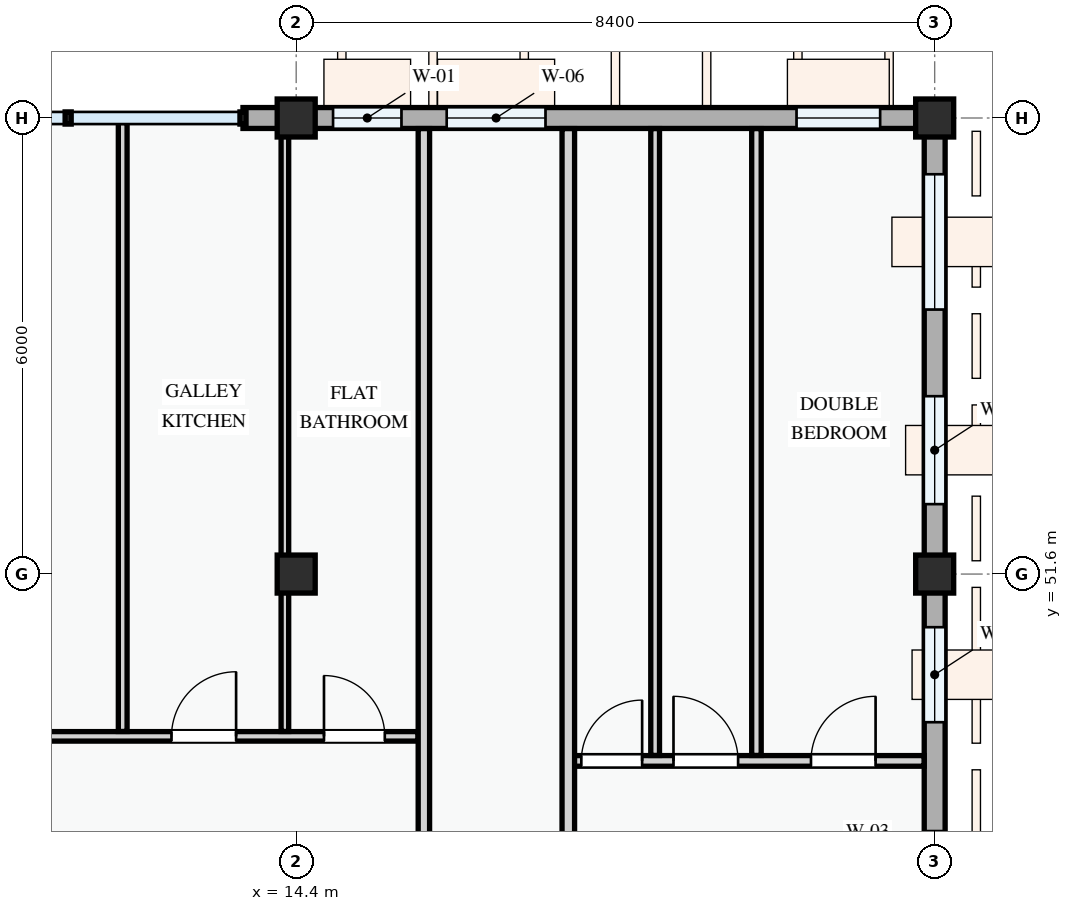
"""IFC4 building model, lengths in metres.
Left out: names, types, materials, properties, quantities, classifications, styles, units other than length and angle.
Written with IfcOpenShell. Run it as: python <this file> out.ifc"""

import sys

from ifc_helpers import new_model, si_unit, direction, frame, frame_2d, origin, origin_2d, place, context, subcontext, project, spatial, rectangle, extrude, element, fill, save


model = new_model("IFC4")
c1 = context("Model", 3, precision=1e-05, world=origin(), true_north=direction((0.0, 1.0)))
c2 = subcontext(c1, "Body", "Model", "MODEL_VIEW")
j1 = project(units=[si_unit("LENGTHUNIT", "METRE"), si_unit("PLANEANGLEUNIT", "RADIAN")], contexts=[c1])
p1 = place(None, origin())
s1 = spatial("IfcSite", under=j1, at=p1, CompositionType="ELEMENT")
p2 = place(p1, origin())
s2 = spatial("IfcBuilding", under=s1, at=p2, CompositionType="ELEMENT")
p3 = place(p2, frame((0.0, 0.0, 24.6)))
s3 = spatial("IfcBuildingStorey", under=s2, at=p3, CompositionType="ELEMENT", Elevation=24.6)
for number, where, z_axis, x_axis in (
    (1, (14.4, 51.6, 0.0), (0.0, 0.0, 1.0), (1.0, 0.0, 0.0)),
    (2, (14.4, 57.6, 0.0), (0.0, 0.0, 1.0), (1.0, 0.0, 0.0)),
    (3, (22.8, 51.6, 0.0), (0.0, 0.0, 1.0), (1.0, 0.0, 0.0)),
    (4, (22.8, 57.6, 0.0), (0.0, 0.0, 1.0), (1.0, 0.0, 0.0)),
):
    element("IfcColumn", number, at=place(p3, frame(where, z_axis=z_axis, x_axis=x_axis)), inside=s3, PredefinedType="COLUMN", context=c2, shape_type="SweptSolid", body=[
        extrude(rectangle(XDim=0.5, YDim=0.5, at=origin_2d()), origin(), (0.0, 0.0, 1.0), 3.3),
    ])
p4 = place(p3, frame((22.8, 43.2, 0.0), z_axis=(0.0, 0.0, 1.0), x_axis=(0.0, 1.0, 0.0)))
e5 = element("IfcWall", 5, at=p4, inside=s3, PredefinedType="STANDARD", context=c2, shape_type="SweptSolid", body=[
    extrude(rectangle(XDim=8.4, YDim=0.275, at=frame_2d((4.2, 0.0))), origin(), (0.0, 0.0, 1.0), 2.425),
])
p5 = place(p4, frame((0.573, 0.0, 0.78)))
e6 = element("IfcOpeningElement", 6, at=p5, cuts=e5, PredefinedType="OPENING", context=c2, shape_type="SweptSolid", body=[
    extrude(rectangle(XDim=2.18, YDim=1.48, at=frame_2d((1.09, 0.74))), frame((0.0, 0.147, 0.0), z_axis=(0.0, -1.0, 0.0), x_axis=(1.0, 0.0, 0.0)), (0.0, 0.0, 1.0), 0.295),
])
p6 = place(p4, frame((3.919, 0.0, 0.78)))
e7 = element("IfcOpeningElement", 7, at=p6, cuts=e5, PredefinedType="OPENING", context=c2, shape_type="SweptSolid", body=[
    extrude(rectangle(XDim=1.1, YDim=1.3, at=frame_2d((0.55, 0.65))), frame((0.0, 0.147, 0.0), z_axis=(0.0, -1.0, 0.0), x_axis=(1.0, 0.0, 0.0)), (0.0, 0.0, 1.0), 0.295),
])
p7 = place(p4, frame((6.451, 0.0, 0.78)))
e8 = element("IfcOpeningElement", 8, at=p7, cuts=e5, PredefinedType="OPENING", context=c2, shape_type="SweptSolid", body=[
    extrude(rectangle(XDim=1.25, YDim=1.3, at=frame_2d((0.625, 0.65))), frame((0.0, 0.147, 0.0), z_axis=(0.0, -1.0, 0.0), x_axis=(1.0, 0.0, 0.0)), (0.0, 0.0, 1.0), 0.295),
])
p8 = place(p3, frame((22.8, 51.6, 0.0), z_axis=(0.0, 0.0, 1.0), x_axis=(0.0, 1.0, 0.0)))
e9 = element("IfcWall", 9, at=p8, inside=s3, PredefinedType="STANDARD", context=c2, shape_type="SweptSolid", body=[
    extrude(rectangle(XDim=6.0, YDim=0.275, at=frame_2d((3.0, 0.0))), origin(), (0.0, 0.0, 1.0), 2.575),
])
p9 = place(p8, frame((0.92, 0.0, 0.78)))
e10 = element("IfcOpeningElement", 10, at=p9, cuts=e9, PredefinedType="OPENING", context=c2, shape_type="SweptSolid", body=[
    extrude(rectangle(XDim=1.42, YDim=1.38, at=frame_2d((0.71, 0.69))), frame((0.0, 0.147, 0.0), z_axis=(0.0, -1.0, 0.0), x_axis=(1.0, 0.0, 0.0)), (0.0, 0.0, 1.0), 0.295),
])
p10 = place(p8, frame((3.48, 0.0, 0.78)))
e11 = element("IfcOpeningElement", 11, at=p10, cuts=e9, PredefinedType="OPENING", context=c2, shape_type="SweptSolid", body=[
    extrude(rectangle(XDim=1.78, YDim=1.42, at=frame_2d((0.89, 0.71))), frame((0.0, 0.147, 0.0), z_axis=(0.0, -1.0, 0.0), x_axis=(1.0, 0.0, 0.0)), (0.0, 0.0, 1.0), 0.295),
])
p11 = place(p3, frame((22.8, 57.6, 0.0), z_axis=(0.0, 0.0, 1.0), x_axis=(-1.0, 0.0, 0.0)))
e12 = element("IfcWall", 12, at=p11, inside=s3, PredefinedType="STANDARD", context=c2, shape_type="SweptSolid", body=[
    extrude(rectangle(XDim=8.4, YDim=0.275, at=frame_2d((4.2, 0.0))), origin(), (0.0, 0.0, 1.0), 2.375),
])
p12 = place(p11, frame((0.717, 0.0, 0.78)))
e13 = element("IfcOpeningElement", 13, at=p12, cuts=e12, PredefinedType="OPENING", context=c2, shape_type="SweptSolid", body=[
    extrude(rectangle(XDim=1.1, YDim=1.3, at=frame_2d((0.55, 0.65))), frame((0.0, 0.147, 0.0), z_axis=(0.0, -1.0, 0.0), x_axis=(1.0, 0.0, 0.0)), (0.0, 0.0, 1.0), 0.295),
])
p13 = place(p11, frame((5.12, 0.0, 0.78)))
e14 = element("IfcOpeningElement", 14, at=p13, cuts=e12, PredefinedType="OPENING", context=c2, shape_type="SweptSolid", body=[
    extrude(rectangle(XDim=1.3, YDim=1.4, at=frame_2d((0.65, 0.7))), frame((0.0, 0.147, 0.0), z_axis=(0.0, -1.0, 0.0), x_axis=(1.0, 0.0, 0.0)), (0.0, 0.0, 1.0), 0.295),
])
p14 = place(p11, frame((7.015, 0.0, 0.78)))
e15 = element("IfcOpeningElement", 15, at=p14, cuts=e12, PredefinedType="OPENING", context=c2, shape_type="SweptSolid", body=[
    extrude(rectangle(XDim=0.9, YDim=1.2, at=frame_2d((0.45, 0.6))), frame((0.0, 0.147, 0.0), z_axis=(0.0, -1.0, 0.0), x_axis=(1.0, 0.0, 0.0)), (0.0, 0.0, 1.0), 0.295),
])
p15 = place(p3, frame((14.4, 57.6, 0.0), z_axis=(0.0, 0.0, 1.0), x_axis=(-1.0, 0.0, 0.0)))
e16 = element("IfcWall", 16, at=p15, inside=s3, PredefinedType="STANDARD", context=c2, shape_type="SweptSolid", body=[
    extrude(rectangle(XDim=0.7, YDim=0.275, at=frame_2d((0.35, 0.0))), origin(), (0.0, 0.0, 1.0), 2.475),
])
p16 = place(p3, frame((8.54, 49.465, 0.0), z_axis=(0.0, 0.0, 1.0), x_axis=(1.0, 0.0, 0.0)))
e17 = element("IfcWall", 17, at=p16, inside=s3, PredefinedType="PARTITIONING", context=c2, shape_type="SweptSolid", body=[
    extrude(rectangle(XDim=7.463, YDim=0.125, at=frame_2d((3.732, 0.0))), origin(), (0.0, 0.0, 1.0), 3.0),
])
p17 = place(p16, frame((1.324, 0.0, 0.0)))
e18 = element("IfcOpeningElement", 18, at=p17, cuts=e17, PredefinedType="OPENING", context=c2, shape_type="SweptSolid", body=[
    extrude(rectangle(XDim=0.85, YDim=2.1, at=frame_2d((0.425, 1.05))), frame((0.0, 0.073, 0.0), z_axis=(0.0, -1.0, 0.0), x_axis=(1.0, 0.0, 0.0)), (0.0, 0.0, 1.0), 0.145),
])
p18 = place(p16, frame((4.22, 0.0, 0.0)))
e19 = element("IfcOpeningElement", 19, at=p18, cuts=e17, PredefinedType="OPENING", context=c2, shape_type="SweptSolid", body=[
    extrude(rectangle(XDim=0.85, YDim=2.1, at=frame_2d((0.425, 1.05))), frame((0.0, 0.073, 0.0), z_axis=(0.0, -1.0, 0.0), x_axis=(1.0, 0.0, 0.0)), (0.0, 0.0, 1.0), 0.145),
])
p19 = place(p16, frame((6.226, 0.0, 0.0)))
e20 = element("IfcOpeningElement", 20, at=p19, cuts=e17, PredefinedType="OPENING", context=c2, shape_type="SweptSolid", body=[
    extrude(rectangle(XDim=0.8, YDim=2.1, at=frame_2d((0.4, 1.05))), frame((0.0, 0.073, 0.0), z_axis=(0.0, -1.0, 0.0), x_axis=(1.0, 0.0, 0.0)), (0.0, 0.0, 1.0), 0.145),
])
p20 = place(p3, frame((12.118, 49.53, 0.0), z_axis=(0.0, 0.0, 1.0), x_axis=(0.0, 1.0, 0.0)))
e21 = element("IfcWall", 21, at=p20, inside=s3, PredefinedType="PARTITIONING", context=c2, shape_type="SweptSolid", body=[
    extrude(rectangle(XDim=8.01, YDim=0.115, at=frame_2d((4.005, 0.0))), origin(), (0.0, 0.0, 1.0), 3.0),
])
p21 = place(p3, frame((14.251, 49.53, 0.0), z_axis=(0.0, 0.0, 1.0), x_axis=(0.0, 1.0, 0.0)))
e22 = element("IfcWall", 22, at=p21, inside=s3, PredefinedType="PARTITIONING", context=c2, shape_type="SweptSolid", body=[
    extrude(rectangle(XDim=7.931, YDim=0.1, at=frame_2d((3.965, 0.0))), origin(), (0.0, 0.0, 1.0), 2.425),
])
p22 = place(p3, frame((17.98, 49.142, 0.0), z_axis=(0.0, 0.0, 1.0), x_axis=(1.0, 0.0, 0.0)))
e23 = element("IfcWall", 23, at=p22, inside=s3, PredefinedType="PARTITIONING", context=c2, shape_type="SweptSolid", body=[
    extrude(rectangle(XDim=4.68, YDim=0.14, at=frame_2d((2.34, 0.0))), origin(), (0.0, 0.0, 1.0), 3.0),
])
p23 = place(p22, frame((0.171, 0.0, 0.0)))
e24 = element("IfcOpeningElement", 24, at=p23, cuts=e23, PredefinedType="OPENING", context=c2, shape_type="SweptSolid", body=[
    extrude(rectangle(XDim=0.8, YDim=2.1, at=frame_2d((0.4, 1.05))), frame((0.0, 0.08, 0.0), z_axis=(0.0, -1.0, 0.0), x_axis=(1.0, 0.0, 0.0)), (0.0, 0.0, 1.0), 0.16),
])
p24 = place(p22, frame((1.384, 0.0, 0.0)))
e25 = element("IfcOpeningElement", 25, at=p24, cuts=e23, PredefinedType="OPENING", context=c2, shape_type="SweptSolid", body=[
    extrude(rectangle(XDim=0.85, YDim=2.1, at=frame_2d((0.425, 1.05))), frame((0.0, 0.08, 0.0), z_axis=(0.0, -1.0, 0.0), x_axis=(1.0, 0.0, 0.0)), (0.0, 0.0, 1.0), 0.16),
])
p25 = place(p22, frame((3.193, 0.0, 0.0)))
e26 = element("IfcOpeningElement", 26, at=p25, cuts=e23, PredefinedType="OPENING", context=c2, shape_type="SweptSolid", body=[
    extrude(rectangle(XDim=0.85, YDim=2.1, at=frame_2d((0.425, 1.05))), frame((0.0, 0.08, 0.0), z_axis=(0.0, -1.0, 0.0), x_axis=(1.0, 0.0, 0.0)), (0.0, 0.0, 1.0), 0.16),
])
p26 = place(p3, frame((20.455, 49.214, 0.0), z_axis=(0.0, 0.0, 1.0), x_axis=(0.0, 1.0, 0.0)))
e27 = element("IfcWall", 27, at=p26, inside=s3, PredefinedType="PARTITIONING", context=c2, shape_type="SweptSolid", body=[
    extrude(rectangle(XDim=8.246, YDim=0.125, at=frame_2d((4.123, 0.0))), origin(), (0.0, 0.0, 1.0), 3.0),
])
p27 = place(p3, frame((19.122, 49.214, 0.0), z_axis=(0.0, 0.0, 1.0), x_axis=(0.0, 1.0, 0.0)))
e28 = element("IfcWall", 28, at=p27, inside=s3, PredefinedType="PARTITIONING", context=c2, shape_type="SweptSolid", body=[
    extrude(rectangle(XDim=8.246, YDim=0.115, at=frame_2d((4.123, 0.0))), origin(), (0.0, 0.0, 1.0), 3.0),
])
p28 = place(p3, frame((16.08, 22.66, 0.0), z_axis=(0.0, 0.0, 1.0), x_axis=(0.0, 1.0, 0.0)))
e29 = element("IfcWall", 29, at=p28, inside=s3, PredefinedType="PARTITIONING", context=c2, shape_type="SweptSolid", body=[
    extrude(rectangle(XDim=34.801, YDim=0.15, at=frame_2d((17.4, 0.0))), origin(), (0.0, 0.0, 1.0), 3.0),
])
p29 = place(p28, frame((2.627, 0.0, 0.0)))
e30 = element("IfcOpeningElement", 30, at=p29, cuts=e29, PredefinedType="OPENING", context=c2, shape_type="SweptSolid", body=[
    extrude(rectangle(XDim=0.96, YDim=2.12, at=frame_2d((0.48, 1.06))), frame((0.0, 0.085, 0.0), z_axis=(0.0, -1.0, 0.0), x_axis=(1.0, 0.0, 0.0)), (0.0, 0.0, 1.0), 0.17),
])
p30 = place(p28, frame((10.02, 0.0, 0.0)))
e31 = element("IfcOpeningElement", 31, at=p30, cuts=e29, PredefinedType="OPENING", context=c2, shape_type="SweptSolid", body=[
    extrude(rectangle(XDim=0.92, YDim=2.1, at=frame_2d((0.46, 1.05))), frame((0.0, 0.085, 0.0), z_axis=(0.0, -1.0, 0.0), x_axis=(1.0, 0.0, 0.0)), (0.0, 0.0, 1.0), 0.17),
])
p31 = place(p28, frame((24.355, 0.0, 0.0)))
e32 = element("IfcOpeningElement", 32, at=p31, cuts=e29, PredefinedType="OPENING", context=c2, shape_type="SweptSolid", body=[
    extrude(rectangle(XDim=0.92, YDim=2.1, at=frame_2d((0.46, 1.05))), frame((0.0, 0.085, 0.0), z_axis=(0.0, -1.0, 0.0), x_axis=(1.0, 0.0, 0.0)), (0.0, 0.0, 1.0), 0.17),
])
p32 = place(p3, frame((17.98, 22.66, 0.0), z_axis=(0.0, 0.0, 1.0), x_axis=(0.0, 1.0, 0.0)))
e33 = element("IfcWall", 33, at=p32, inside=s3, PredefinedType="PARTITIONING", context=c2, shape_type="SweptSolid", body=[
    extrude(rectangle(XDim=34.801, YDim=0.165, at=frame_2d((17.4, 0.0))), origin(), (0.0, 0.0, 1.0), 3.0),
])
p33 = place(p32, frame((2.63, 0.0, 0.0)))
e34 = element("IfcOpeningElement", 34, at=p33, cuts=e33, PredefinedType="OPENING", context=c2, shape_type="SweptSolid", body=[
    extrude(rectangle(XDim=0.92, YDim=2.1, at=frame_2d((0.46, 1.05))), frame((0.0, 0.093, 0.0), z_axis=(0.0, -1.0, 0.0), x_axis=(1.0, 0.0, 0.0)), (0.0, 0.0, 1.0), 0.185),
])
p34 = place(p32, frame((10.02, 0.0, 0.0)))
e35 = element("IfcOpeningElement", 35, at=p34, cuts=e33, PredefinedType="OPENING", context=c2, shape_type="SweptSolid", body=[
    extrude(rectangle(XDim=0.92, YDim=2.1, at=frame_2d((0.46, 1.05))), frame((0.0, 0.093, 0.0), z_axis=(0.0, -1.0, 0.0), x_axis=(1.0, 0.0, 0.0)), (0.0, 0.0, 1.0), 0.185),
])
p35 = place(p32, frame((24.289, 0.0, 0.0)))
e36 = element("IfcOpeningElement", 36, at=p35, cuts=e33, PredefinedType="OPENING", context=c2, shape_type="SweptSolid", body=[
    extrude(rectangle(XDim=0.96, YDim=2.12, at=frame_2d((0.48, 1.06))), frame((0.0, 0.093, 0.0), z_axis=(0.0, -1.0, 0.0), x_axis=(1.0, 0.0, 0.0)), (0.0, 0.0, 1.0), 0.185),
])
p36 = place(p6, origin())
e37 = element("IfcWindow", 37, at=p36, inside=s3, PartitioningType="SINGLE_PANEL", PredefinedType="WINDOW", context=c2, shape_type="SweptSolid", body=[
    extrude(rectangle(XDim=1.1, YDim=1.3, at=frame_2d((0.55, 0.65))), frame((0.0, 0.03, 0.0), z_axis=(0.0, -1.0, 0.0), x_axis=(1.0, 0.0, 0.0)), (0.0, 0.0, 1.0), 0.06),
])
fill(e7, e37)
p37 = place(p7, origin())
e38 = element("IfcWindow", 38, at=p37, inside=s3, PartitioningType="SINGLE_PANEL", PredefinedType="WINDOW", context=c2, shape_type="SweptSolid", body=[
    extrude(rectangle(XDim=1.25, YDim=1.3, at=frame_2d((0.625, 0.65))), frame((0.0, 0.03, 0.0), z_axis=(0.0, -1.0, 0.0), x_axis=(1.0, 0.0, 0.0)), (0.0, 0.0, 1.0), 0.06),
])
fill(e8, e38)
p38 = place(p9, origin())
e39 = element("IfcWindow", 39, at=p38, inside=s3, PartitioningType="SINGLE_PANEL", PredefinedType="WINDOW", context=c2, shape_type="SweptSolid", body=[
    extrude(rectangle(XDim=1.42, YDim=1.38, at=frame_2d((0.71, 0.69))), frame((0.0, 0.03, 0.0), z_axis=(0.0, -1.0, 0.0), x_axis=(1.0, 0.0, 0.0)), (0.0, 0.0, 1.0), 0.06),
])
fill(e10, e39)
p39 = place(p10, origin())
e40 = element("IfcWindow", 40, at=p39, inside=s3, PartitioningType="DOUBLE_PANEL_VERTICAL", PredefinedType="WINDOW", context=c2, shape_type="SweptSolid", body=[
    extrude(rectangle(XDim=1.78, YDim=1.42, at=frame_2d((0.89, 0.71))), frame((0.0, 0.03, 0.0), z_axis=(0.0, -1.0, 0.0), x_axis=(1.0, 0.0, 0.0)), (0.0, 0.0, 1.0), 0.06),
])
fill(e11, e40)
p40 = place(p12, origin())
e41 = element("IfcWindow", 41, at=p40, inside=s3, PartitioningType="SINGLE_PANEL", PredefinedType="WINDOW", context=c2, shape_type="SweptSolid", body=[
    extrude(rectangle(XDim=1.1, YDim=1.3, at=frame_2d((0.55, 0.65))), frame((0.0, 0.03, 0.0), z_axis=(0.0, -1.0, 0.0), x_axis=(1.0, 0.0, 0.0)), (0.0, 0.0, 1.0), 0.06),
])
fill(e13, e41)
p41 = place(p13, origin())
e42 = element("IfcWindow", 42, at=p41, inside=s3, PartitioningType="SINGLE_PANEL", PredefinedType="WINDOW", context=c2, shape_type="SweptSolid", body=[
    extrude(rectangle(XDim=1.3, YDim=1.4, at=frame_2d((0.65, 0.7))), frame((0.0, 0.03, 0.0), z_axis=(0.0, -1.0, 0.0), x_axis=(1.0, 0.0, 0.0)), (0.0, 0.0, 1.0), 0.06),
])
fill(e14, e42)
p42 = place(p14, origin())
e43 = element("IfcWindow", 43, at=p42, inside=s3, PartitioningType="SINGLE_PANEL", PredefinedType="WINDOW", context=c2, shape_type="SweptSolid", body=[
    extrude(rectangle(XDim=0.9, YDim=1.2, at=frame_2d((0.45, 0.6))), frame((0.0, 0.03, 0.0), z_axis=(0.0, -1.0, 0.0), x_axis=(1.0, 0.0, 0.0)), (0.0, 0.0, 1.0), 0.06),
])
fill(e15, e43)
p43 = place(p18, origin())
e44 = element("IfcDoor", 44, at=p43, inside=s3, OperationType="SINGLE_SWING_RIGHT", PredefinedType="DOOR", context=c2, shape_type="SweptSolid", body=[
    extrude(rectangle(XDim=0.85, YDim=2.1, at=frame_2d((0.425, 1.05))), frame((0.0, 0.025, 0.0), z_axis=(0.0, -1.0, 0.0), x_axis=(1.0, 0.0, 0.0)), (0.0, 0.0, 1.0), 0.05),
])
fill(e19, e44)
p44 = place(p19, origin())
e45 = element("IfcDoor", 45, at=p44, inside=s3, OperationType="SINGLE_SWING_LEFT", PredefinedType="DOOR", context=c2, shape_type="SweptSolid", body=[
    extrude(rectangle(XDim=0.8, YDim=2.1, at=frame_2d((0.4, 1.05))), frame((0.0, 0.025, 0.0), z_axis=(0.0, -1.0, 0.0), x_axis=(1.0, 0.0, 0.0)), (0.0, 0.0, 1.0), 0.05),
])
fill(e20, e45)
p45 = place(p23, origin())
e46 = element("IfcDoor", 46, at=p45, inside=s3, OperationType="SINGLE_SWING_RIGHT", PredefinedType="DOOR", context=c2, shape_type="SweptSolid", body=[
    extrude(rectangle(XDim=0.8, YDim=2.1, at=frame_2d((0.4, 1.05))), frame((0.0, 0.025, 0.0), z_axis=(0.0, -1.0, 0.0), x_axis=(1.0, 0.0, 0.0)), (0.0, 0.0, 1.0), 0.05),
])
fill(e24, e46)
p46 = place(p24, origin())
e47 = element("IfcDoor", 47, at=p46, inside=s3, OperationType="SINGLE_SWING_LEFT", PredefinedType="DOOR", context=c2, shape_type="SweptSolid", body=[
    extrude(rectangle(XDim=0.85, YDim=2.1, at=frame_2d((0.425, 1.05))), frame((0.0, 0.025, 0.0), z_axis=(0.0, -1.0, 0.0), x_axis=(1.0, 0.0, 0.0)), (0.0, 0.0, 1.0), 0.05),
])
fill(e25, e47)
p47 = place(p25, origin())
e48 = element("IfcDoor", 48, at=p47, inside=s3, OperationType="SINGLE_SWING_RIGHT", PredefinedType="DOOR", context=c2, shape_type="SweptSolid", body=[
    extrude(rectangle(XDim=0.85, YDim=2.1, at=frame_2d((0.425, 1.05))), frame((0.0, 0.025, 0.0), z_axis=(0.0, -1.0, 0.0), x_axis=(1.0, 0.0, 0.0)), (0.0, 0.0, 1.0), 0.05),
])
fill(e26, e48)
save(model, sys.argv[1])
